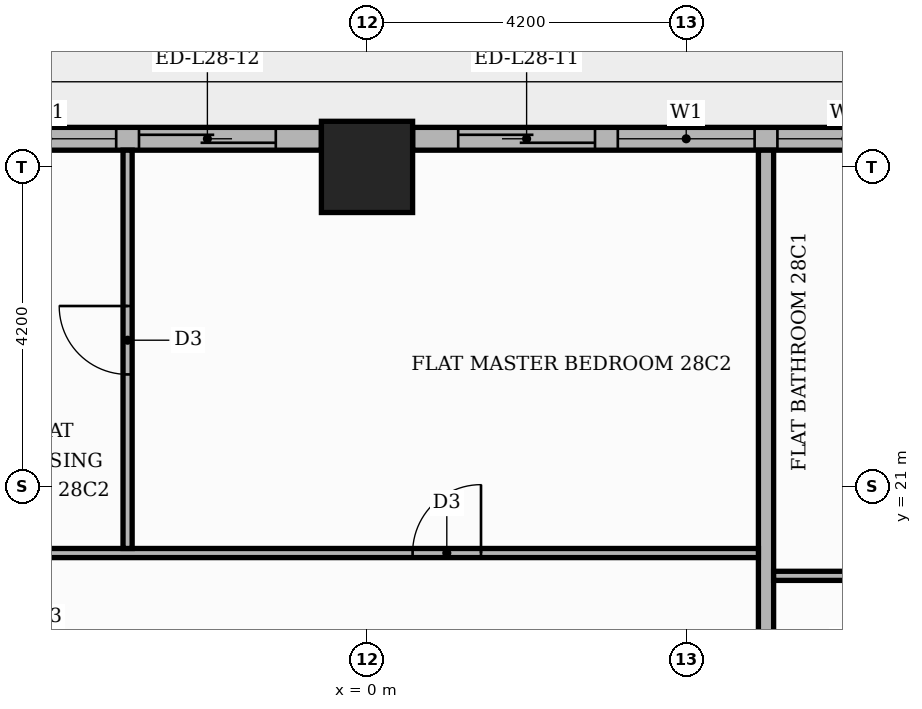
"""IFC4 building model, lengths in metres.
Left out: names, types, materials, properties, quantities, classifications, styles, units other than length and angle.
Written with IfcOpenShell. Run it as: python <this file> out.ifc"""

import sys

from ifc_helpers import new_model, si_unit, direction, frame, frame_2d, origin, origin_2d, place, context, subcontext, project, spatial, rectangle, extrude, element, fill, save


model = new_model("IFC4")
c1 = context("Model", 3, precision=1e-05, world=origin(), true_north=direction((0.0, 1.0)))
c2 = subcontext(c1, "Body", "Model", "MODEL_VIEW")
j1 = project(units=[si_unit("LENGTHUNIT", "METRE"), si_unit("PLANEANGLEUNIT", "RADIAN")], contexts=[c1])
p1 = place(None, origin())
s1 = spatial("IfcSite", under=j1, at=p1, CompositionType="ELEMENT")
p2 = place(p1, origin())
s2 = spatial("IfcBuilding", under=s1, at=p2, CompositionType="ELEMENT")
p3 = place(p2, frame((0.0, 0.0, 118.2)))
s3 = spatial("IfcBuildingStorey", under=s2, at=p3, CompositionType="ELEMENT", Elevation=118.2)
p4 = place(p3, frame((0.0, 25.2, 0.0), z_axis=(0.0, 0.0, 1.0), x_axis=(1.0, 0.0, 0.0)))
e1 = element("IfcColumn", 1, at=p4, inside=s3, PredefinedType="COLUMN", context=c2, shape_type="SweptSolid", body=[
    extrude(rectangle(XDim=1.2, YDim=1.2, at=origin_2d()), origin(), (0.0, 0.0, 1.0), 3.9),
])
p5 = place(p3, frame((7.8, 25.57, 0.0), z_axis=(0.0, 0.0, 1.0), x_axis=(-1.0, 0.0, 0.0)))
e2 = element("IfcWall", 2, at=p5, inside=s3, PredefinedType="STANDARD", context=c2, shape_type="SweptSolid", body=[
    extrude(rectangle(XDim=7.2, YDim=0.3, at=frame_2d((3.6, 0.0))), origin(), (0.0, 0.0, 1.0), 3.48),
])
p6 = place(p5, frame((0.6, 0.0, 0.9)))
e3 = element("IfcOpeningElement", 3, at=p6, cuts=e2, PredefinedType="OPENING", context=c2, shape_type="SweptSolid", body=[
    extrude(rectangle(XDim=1.8, YDim=2.1, at=frame_2d((0.9, 1.05))), frame((0.0, 0.16, 0.0), z_axis=(0.0, -1.0, 0.0), x_axis=(1.0, 0.0, 0.0)), (0.0, 0.0, 1.0), 0.32),
])
p7 = place(p5, frame((2.7, 0.0, 0.9)))
e4 = element("IfcOpeningElement", 4, at=p7, cuts=e2, PredefinedType="OPENING", context=c2, shape_type="SweptSolid", body=[
    extrude(rectangle(XDim=1.8, YDim=2.1, at=frame_2d((0.9, 1.05))), frame((0.0, 0.16, 0.0), z_axis=(0.0, -1.0, 0.0), x_axis=(1.0, 0.0, 0.0)), (0.0, 0.0, 1.0), 0.32),
])
p8 = place(p5, frame((4.8, 0.0, 0.0)))
e5 = element("IfcOpeningElement", 5, at=p8, cuts=e2, PredefinedType="OPENING", context=c2, shape_type="SweptSolid", body=[
    extrude(rectangle(XDim=1.8, YDim=2.4, at=frame_2d((0.9, 1.2))), frame((0.0, 0.16, 0.0), z_axis=(0.0, -1.0, 0.0), x_axis=(1.0, 0.0, 0.0)), (0.0, 0.0, 1.0), 0.32),
])
p9 = place(p3, frame((-0.6, 25.57, 0.0), z_axis=(0.0, 0.0, 1.0), x_axis=(-1.0, 0.0, 0.0)))
e6 = element("IfcWall", 6, at=p9, inside=s3, PredefinedType="STANDARD", context=c2, shape_type="SweptSolid", body=[
    extrude(rectangle(XDim=7.2, YDim=0.3, at=frame_2d((3.6, 0.0))), origin(), (0.0, 0.0, 1.0), 3.48),
])
p10 = place(p9, frame((0.6, 0.0, 0.0)))
e7 = element("IfcOpeningElement", 7, at=p10, cuts=e6, PredefinedType="OPENING", context=c2, shape_type="SweptSolid", body=[
    extrude(rectangle(XDim=1.8, YDim=2.4, at=frame_2d((0.9, 1.2))), frame((0.0, 0.16, 0.0), z_axis=(0.0, -1.0, 0.0), x_axis=(1.0, 0.0, 0.0)), (0.0, 0.0, 1.0), 0.32),
])
p11 = place(p9, frame((2.7, 0.0, 0.9)))
e8 = element("IfcOpeningElement", 8, at=p11, cuts=e6, PredefinedType="OPENING", context=c2, shape_type="SweptSolid", body=[
    extrude(rectangle(XDim=1.8, YDim=2.1, at=frame_2d((0.9, 1.05))), frame((0.0, 0.16, 0.0), z_axis=(0.0, -1.0, 0.0), x_axis=(1.0, 0.0, 0.0)), (0.0, 0.0, 1.0), 0.32),
])
p12 = place(p9, frame((4.8, 0.0, 0.9)))
e9 = element("IfcOpeningElement", 9, at=p12, cuts=e6, PredefinedType="OPENING", context=c2, shape_type="SweptSolid", body=[
    extrude(rectangle(XDim=1.8, YDim=2.1, at=frame_2d((0.9, 1.05))), frame((0.0, 0.16, 0.0), z_axis=(0.0, -1.0, 0.0), x_axis=(1.0, 0.0, 0.0)), (0.0, 0.0, 1.0), 0.32),
])
p13 = place(p3, frame((5.25, 13.75, 0.0), z_axis=(0.0, 0.0, 1.0), x_axis=(0.0, 1.0, 0.0)))
e10 = element("IfcWall", 10, at=p13, inside=s3, PredefinedType="PARTITIONING", context=c2, shape_type="SweptSolid", body=[
    extrude(rectangle(XDim=11.67, YDim=0.2, at=frame_2d((5.835, 0.0))), origin(), (0.0, 0.0, 1.0), 3.48),
])
p14 = place(p3, frame((5.35, 19.82, 0.0), z_axis=(0.0, 0.0, 1.0), x_axis=(1.0, 0.0, 0.0)))
e11 = element("IfcWall", 11, at=p14, inside=s3, PredefinedType="PARTITIONING", context=c2, shape_type="SweptSolid", body=[
    extrude(rectangle(XDim=12.05, YDim=0.12, at=frame_2d((6.025, 0.0))), origin(), (0.0, 0.0, 1.0), 3.48),
])
p15 = place(p14, frame((8.85, 0.0, 0.0)))
e12 = element("IfcOpeningElement", 12, at=p15, cuts=e11, PredefinedType="OPENING", context=c2, shape_type="SweptSolid", body=[
    extrude(rectangle(XDim=1.0, YDim=2.1, at=frame_2d((0.5, 1.05))), frame((0.0, 0.07, 0.0), z_axis=(0.0, -1.0, 0.0), x_axis=(1.0, 0.0, 0.0)), (0.0, 0.0, 1.0), 0.14),
])
p16 = place(p14, frame((5.75, 0.0, 0.0)))
e13 = element("IfcOpeningElement", 13, at=p16, cuts=e11, PredefinedType="OPENING", context=c2, shape_type="SweptSolid", body=[
    extrude(rectangle(XDim=0.9, YDim=2.1, at=frame_2d((0.45, 1.05))), frame((0.0, 0.07, 0.0), z_axis=(0.0, -1.0, 0.0), x_axis=(1.0, 0.0, 0.0)), (0.0, 0.0, 1.0), 0.14),
])
p17 = place(p3, frame((-13.55, 20.12, 0.0), z_axis=(0.0, 0.0, 1.0), x_axis=(1.0, 0.0, 0.0)))
e14 = element("IfcWall", 14, at=p17, inside=s3, PredefinedType="PARTITIONING", context=c2, shape_type="SweptSolid", body=[
    extrude(rectangle(XDim=18.7, YDim=0.12, at=frame_2d((9.35, 0.0))), origin(), (0.0, 0.0, 1.0), 3.48),
])
p18 = place(p17, frame((14.15, 0.0, 0.0)))
e15 = element("IfcOpeningElement", 15, at=p18, cuts=e14, PredefinedType="OPENING", context=c2, shape_type="SweptSolid", body=[
    extrude(rectangle(XDim=0.9, YDim=2.1, at=frame_2d((0.45, 1.05))), frame((0.0, 0.07, 0.0), z_axis=(0.0, -1.0, 0.0), x_axis=(1.0, 0.0, 0.0)), (0.0, 0.0, 1.0), 0.14),
])
p19 = place(p17, frame((2.55, 0.0, 0.0)))
e16 = element("IfcOpeningElement", 16, at=p19, cuts=e14, PredefinedType="OPENING", context=c2, shape_type="SweptSolid", body=[
    extrude(rectangle(XDim=1.0, YDim=2.1, at=frame_2d((0.5, 1.05))), frame((0.0, 0.07, 0.0), z_axis=(0.0, -1.0, 0.0), x_axis=(1.0, 0.0, 0.0)), (0.0, 0.0, 1.0), 0.14),
])
p20 = place(p3, frame((-3.15, 20.18, 0.0), z_axis=(0.0, 0.0, 1.0), x_axis=(0.0, 1.0, 0.0)))
e17 = element("IfcWall", 17, at=p20, inside=s3, PredefinedType="PARTITIONING", context=c2, shape_type="SweptSolid", body=[
    extrude(rectangle(XDim=5.24, YDim=0.12, at=frame_2d((2.62, 0.0))), origin(), (0.0, 0.0, 1.0), 3.48),
])
p21 = place(p20, frame((2.29, 0.0, 0.0)))
e18 = element("IfcOpeningElement", 18, at=p21, cuts=e17, PredefinedType="OPENING", context=c2, shape_type="SweptSolid", body=[
    extrude(rectangle(XDim=0.9, YDim=2.1, at=frame_2d((0.45, 1.05))), frame((0.0, 0.07, 0.0), z_axis=(0.0, -1.0, 0.0), x_axis=(1.0, 0.0, 0.0)), (0.0, 0.0, 1.0), 0.14),
])
p22 = place(p6, origin())
e19 = element("IfcWindow", 19, at=p22, inside=s3, PartitioningType="SINGLE_PANEL", PredefinedType="WINDOW", context=c2, shape_type="SweptSolid", body=[
    extrude(rectangle(XDim=1.8, YDim=2.1, at=frame_2d((0.9, 1.05))), frame((0.0, 0.03, 0.0), z_axis=(0.0, -1.0, 0.0), x_axis=(1.0, 0.0, 0.0)), (0.0, 0.0, 1.0), 0.06),
])
fill(e3, e19)
p23 = place(p7, origin())
e20 = element("IfcWindow", 20, at=p23, inside=s3, PartitioningType="SINGLE_PANEL", PredefinedType="WINDOW", context=c2, shape_type="SweptSolid", body=[
    extrude(rectangle(XDim=1.8, YDim=2.1, at=frame_2d((0.9, 1.05))), frame((0.0, 0.03, 0.0), z_axis=(0.0, -1.0, 0.0), x_axis=(1.0, 0.0, 0.0)), (0.0, 0.0, 1.0), 0.06),
])
fill(e4, e20)
p24 = place(p8, origin())
e21 = element("IfcDoor", 21, at=p24, inside=s3, OperationType="SLIDING_TO_RIGHT", PredefinedType="DOOR", context=c2, shape_type="SweptSolid", body=[
    extrude(rectangle(XDim=1.8, YDim=2.4, at=frame_2d((0.9, 1.2))), frame((0.0, 0.025, 0.0), z_axis=(0.0, -1.0, 0.0), x_axis=(1.0, 0.0, 0.0)), (0.0, 0.0, 1.0), 0.05),
])
fill(e5, e21)
p25 = place(p10, origin())
e22 = element("IfcDoor", 22, at=p25, inside=s3, OperationType="SLIDING_TO_LEFT", PredefinedType="DOOR", context=c2, shape_type="SweptSolid", body=[
    extrude(rectangle(XDim=1.8, YDim=2.4, at=frame_2d((0.9, 1.2))), frame((0.0, 0.025, 0.0), z_axis=(0.0, -1.0, 0.0), x_axis=(1.0, 0.0, 0.0)), (0.0, 0.0, 1.0), 0.05),
])
fill(e7, e22)
p26 = place(p11, origin())
e23 = element("IfcWindow", 23, at=p26, inside=s3, PartitioningType="SINGLE_PANEL", PredefinedType="WINDOW", context=c2, shape_type="SweptSolid", body=[
    extrude(rectangle(XDim=1.8, YDim=2.1, at=frame_2d((0.9, 1.05))), frame((0.0, 0.03, 0.0), z_axis=(0.0, -1.0, 0.0), x_axis=(1.0, 0.0, 0.0)), (0.0, 0.0, 1.0), 0.06),
])
fill(e8, e23)
p27 = place(p18, origin())
e24 = element("IfcDoor", 24, at=p27, inside=s3, OperationType="SINGLE_SWING_RIGHT", PredefinedType="DOOR", context=c2, shape_type="SweptSolid", body=[
    extrude(rectangle(XDim=0.9, YDim=2.1, at=frame_2d((0.45, 1.05))), frame((0.0, 0.025, 0.0), z_axis=(0.0, -1.0, 0.0), x_axis=(1.0, 0.0, 0.0)), (0.0, 0.0, 1.0), 0.05),
])
fill(e15, e24)
p28 = place(p21, origin())
e25 = element("IfcDoor", 25, at=p28, inside=s3, OperationType="SINGLE_SWING_RIGHT", PredefinedType="DOOR", context=c2, shape_type="SweptSolid", body=[
    extrude(rectangle(XDim=0.9, YDim=2.1, at=frame_2d((0.45, 1.05))), frame((0.0, 0.025, 0.0), z_axis=(0.0, -1.0, 0.0), x_axis=(1.0, 0.0, 0.0)), (0.0, 0.0, 1.0), 0.05),
])
fill(e18, e25)
save(model, sys.argv[1])
